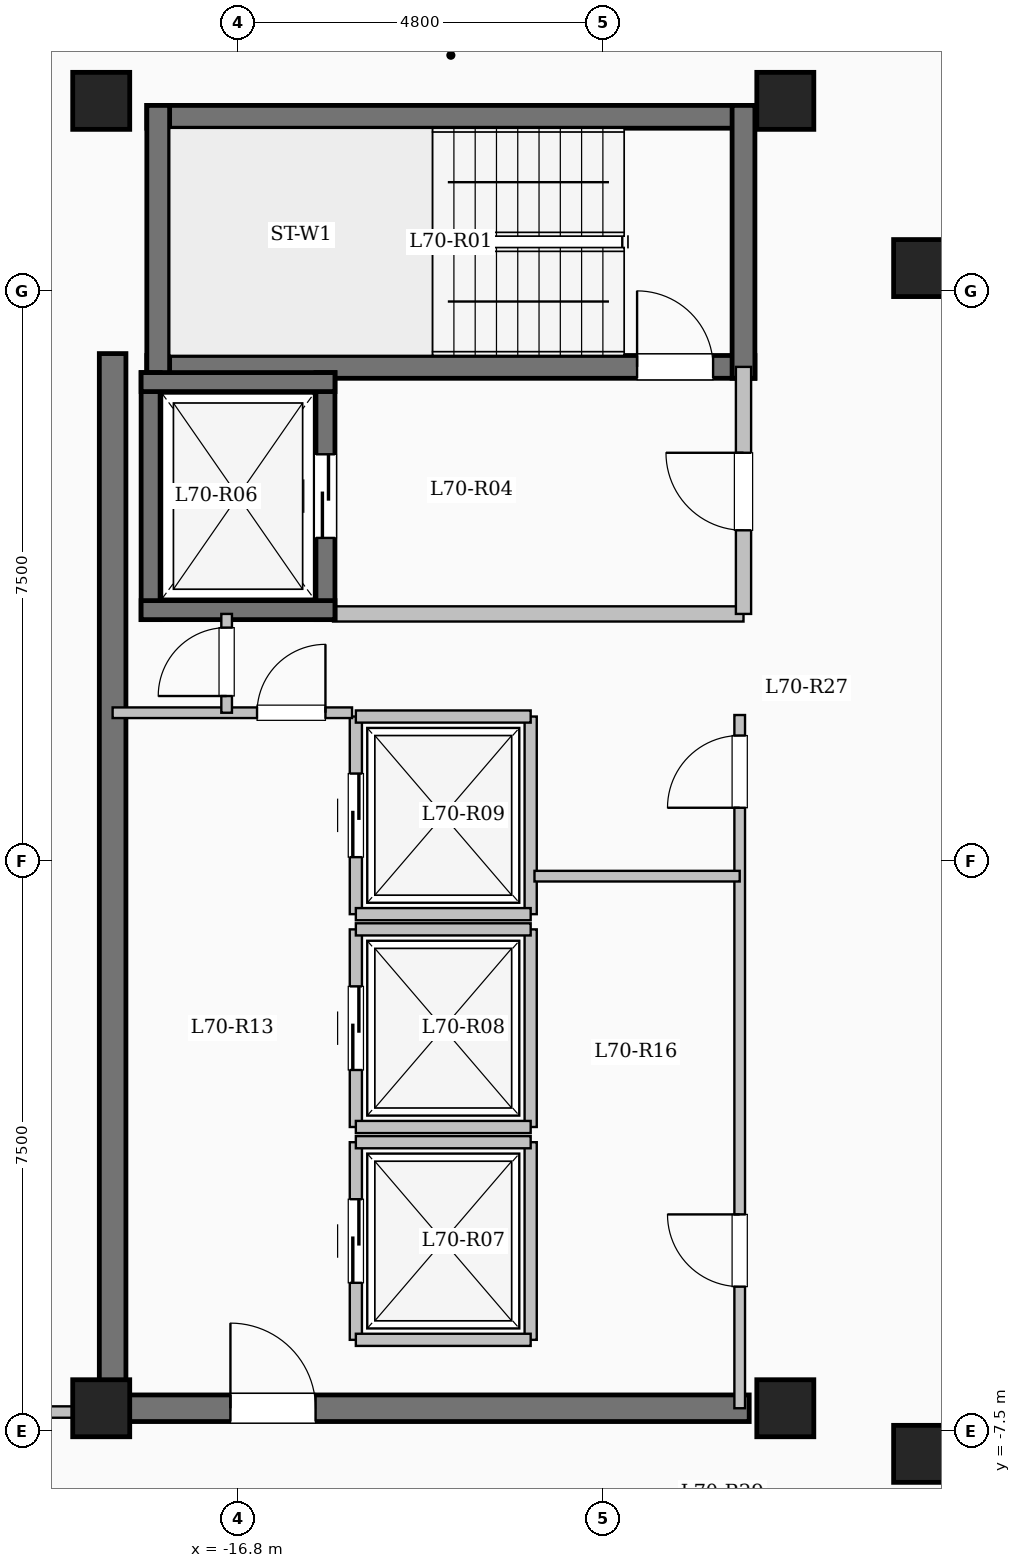
"""IFC4 building model, lengths in metres.
Left out: names, types, materials, properties, quantities, classifications, styles, units other than length and angle.
Written with IfcOpenShell. Run it as: python <this file> out.ifc"""

import sys

from ifc_helpers import new_model, si_unit, direction, frame, frame_2d, origin, origin_2d, place, context, subcontext, project, spatial, rectangle, extrude, element, fill, save


model = new_model("IFC4")
c1 = context("Model", 3, precision=1e-05, world=origin(), true_north=direction((0.0, 1.0)))
c2 = subcontext(c1, "Body", "Model", "MODEL_VIEW")
j1 = project(units=[si_unit("LENGTHUNIT", "METRE"), si_unit("PLANEANGLEUNIT", "RADIAN")], contexts=[c1])
p1 = place(None, origin())
s1 = spatial("IfcSite", under=j1, at=p1, CompositionType="ELEMENT")
p2 = place(p1, origin())
s2 = spatial("IfcBuilding", under=s1, at=p2, CompositionType="ELEMENT")
p3 = place(p2, frame((0.0, 0.0, 258.25)))
s3 = spatial("IfcBuildingStorey", under=s2, at=p3, CompositionType="ELEMENT", Elevation=258.25)
for number, where, z_axis, x_axis in (
    (1, (-7.8, -7.8, 0.0), (0.0, 0.0, 1.0), (1.0, 0.0, 0.0)),
    (2, (-7.8, 7.8, 0.0), (0.0, 0.0, 1.0), (1.0, 0.0, 0.0)),
    (3, (-9.6, -7.2, 0.0), (0.0, 0.0, 1.0), (1.0, 0.0, 0.0)),
    (4, (-9.6, 10.0, 0.0), (0.0, 0.0, 1.0), (1.0, 0.0, 0.0)),
    (5, (-18.6, -7.2, 0.0), (0.0, 0.0, 1.0), (1.0, 0.0, 0.0)),
    (6, (-18.6, 10.0, 0.0), (0.0, 0.0, 1.0), (1.0, 0.0, 0.0)),
):
    element("IfcColumn", number, at=place(p3, frame(where, z_axis=z_axis, x_axis=x_axis)), inside=s3, PredefinedType="COLUMN", context=c2, shape_type="SweptSolid", body=[
        extrude(rectangle(XDim=0.75, YDim=0.75, at=origin_2d()), origin(), (0.0, 0.0, 1.0), 3.35),
    ])
p4 = place(p3, frame((-18.0, 9.79, 0.0), z_axis=(0.0, 0.0, 1.0), x_axis=(1.0, 0.0, 0.0)))
e7 = element("IfcWall", 7, at=p4, inside=s3, PredefinedType="SHEAR", context=c2, shape_type="SweptSolid", body=[
    extrude(rectangle(XDim=8.0, YDim=0.3, at=frame_2d((4.0, 0.0))), origin(), (0.0, 0.0, 1.0), 3.35),
])
p5 = place(p3, frame((-18.0, 6.5, 0.0), z_axis=(0.0, 0.0, 1.0), x_axis=(1.0, 0.0, 0.0)))
e8 = element("IfcWall", 8, at=p5, inside=s3, PredefinedType="SHEAR", context=c2, shape_type="SweptSolid", body=[
    extrude(rectangle(XDim=8.0, YDim=0.3, at=frame_2d((4.0, 0.0))), origin(), (0.0, 0.0, 1.0), 3.35),
])
p6 = place(p5, frame((6.45, 0.0, 0.0)))
e9 = element("IfcOpeningElement", 9, at=p6, cuts=e8, PredefinedType="OPENING", context=c2, shape_type="SweptSolid", body=[
    extrude(rectangle(XDim=1.0, YDim=2.15, at=frame_2d((0.5, 1.075))), frame((0.0, 0.16, 0.0), z_axis=(0.0, -1.0, 0.0), x_axis=(1.0, 0.0, 0.0)), (0.0, 0.0, 1.0), 0.32),
])
for number, where, z_axis, x_axis in (
    (10, (-17.85, 6.35, 0.0), (0.0, 0.0, 1.0), (0.0, 1.0, 0.0)),
    (11, (-10.15, 6.35, 0.0), (0.0, 0.0, 1.0), (0.0, 1.0, 0.0)),
):
    element("IfcWall", number, at=place(p3, frame(where, z_axis=z_axis, x_axis=x_axis)), inside=s3, PredefinedType="SHEAR", context=c2, shape_type="SweptSolid", body=[
        extrude(rectangle(XDim=3.59, YDim=0.3, at=frame_2d((1.795, 0.0))), origin(), (0.0, 0.0, 1.0), 3.35),
    ])
p7 = place(p3, frame((-15.55, 3.25, 0.0), z_axis=(0.0, 0.0, 1.0), x_axis=(1.0, 0.0, 0.0)))
e12 = element("IfcWall", 12, at=p7, inside=s3, PredefinedType="SOLIDWALL", context=c2, shape_type="SweptSolid", body=[
    extrude(rectangle(XDim=5.4, YDim=0.2, at=frame_2d((2.7, 0.0))), origin(), (0.0, 0.0, 1.0), 3.1),
])
p8 = place(p3, frame((-10.15, 3.25, 0.0), z_axis=(0.0, 0.0, 1.0), x_axis=(0.0, 1.0, 0.0)))
e13 = element("IfcWall", 13, at=p8, inside=s3, PredefinedType="SOLIDWALL", context=c2, shape_type="SweptSolid", body=[
    extrude(rectangle(XDim=3.25, YDim=0.2, at=frame_2d((1.625, 0.0))), origin(), (0.0, 0.0, 1.0), 3.1),
])
p9 = place(p8, frame((1.1, 0.0, 0.0)))
e14 = element("IfcOpeningElement", 14, at=p9, cuts=e13, PredefinedType="OPENING", context=c2, shape_type="SweptSolid", body=[
    extrude(rectangle(XDim=1.02, YDim=2.15, at=frame_2d((0.51, 1.075))), frame((0.0, 0.11, 0.0), z_axis=(0.0, -1.0, 0.0), x_axis=(1.0, 0.0, 0.0)), (0.0, 0.0, 1.0), 0.22),
])
p10 = place(p3, frame((-17.95, 3.175, 0.0), z_axis=(0.0, 0.0, 1.0), x_axis=(0.0, 1.0, 0.0)))
e15 = element("IfcWall", 15, at=p10, inside=s3, PredefinedType="SHEAR", context=c2, shape_type="SweptSolid", body=[
    extrude(rectangle(XDim=3.25, YDim=0.25, at=frame_2d((1.625, 0.0))), origin(), (0.0, 0.0, 1.0), 3.35),
])
p11 = place(p3, frame((-15.65, 3.175, 0.0), z_axis=(0.0, 0.0, 1.0), x_axis=(0.0, 1.0, 0.0)))
e16 = element("IfcWall", 16, at=p11, inside=s3, PredefinedType="SHEAR", context=c2, shape_type="SweptSolid", body=[
    extrude(rectangle(XDim=3.25, YDim=0.25, at=frame_2d((1.625, 0.0))), origin(), (0.0, 0.0, 1.0), 3.35),
])
p12 = place(p11, frame((1.075, 0.0, 0.0)))
e17 = element("IfcOpeningElement", 17, at=p12, cuts=e16, PredefinedType="OPENING", context=c2, shape_type="SweptSolid", body=[
    extrude(rectangle(XDim=1.1, YDim=2.15, at=frame_2d((0.55, 1.075))), frame((0.0, 0.135, 0.0), z_axis=(0.0, -1.0, 0.0), x_axis=(1.0, 0.0, 0.0)), (0.0, 0.0, 1.0), 0.27),
])
for number, where, z_axis, x_axis in (
    (18, (-18.075, 3.3, 0.0), (0.0, 0.0, 1.0), (1.0, 0.0, 0.0)),
    (19, (-18.075, 6.3, 0.0), (0.0, 0.0, 1.0), (1.0, 0.0, 0.0)),
):
    element("IfcWall", number, at=place(p3, frame(where, z_axis=z_axis, x_axis=x_axis)), inside=s3, PredefinedType="SHEAR", context=c2, shape_type="SweptSolid", body=[
        extrude(rectangle(XDim=2.55, YDim=0.25, at=frame_2d((1.275, 0.0))), origin(), (0.0, 0.0, 1.0), 3.35),
    ])
p13 = place(p3, frame((-15.25, -6.3, 0.0), z_axis=(0.0, 0.0, 1.0), x_axis=(0.0, 1.0, 0.0)))
e20 = element("IfcWall", 20, at=p13, inside=s3, PredefinedType="SOLIDWALL", context=c2, shape_type="SweptSolid", body=[
    extrude(rectangle(XDim=2.6, YDim=0.16, at=frame_2d((1.3, 0.0))), origin(), (0.0, 0.0, 1.0), 3.1),
])
p14 = place(p13, frame((0.75, 0.0, 0.0)))
e21 = element("IfcOpeningElement", 21, at=p14, cuts=e20, PredefinedType="OPENING", context=c2, shape_type="SweptSolid", body=[
    extrude(rectangle(XDim=1.1, YDim=2.15, at=frame_2d((0.55, 1.075))), frame((0.0, 0.09, 0.0), z_axis=(0.0, -1.0, 0.0), x_axis=(1.0, 0.0, 0.0)), (0.0, 0.0, 1.0), 0.18),
])
p15 = place(p3, frame((-12.95, -6.3, 0.0), z_axis=(0.0, 0.0, 1.0), x_axis=(0.0, 1.0, 0.0)))
e22 = element("IfcWall", 22, at=p15, inside=s3, PredefinedType="SOLIDWALL", context=c2, shape_type="SweptSolid", body=[
    extrude(rectangle(XDim=2.6, YDim=0.16, at=frame_2d((1.3, 0.0))), origin(), (0.0, 0.0, 1.0), 3.1),
])
for number, where, z_axis, x_axis in (
    (23, (-15.25, -6.3, 0.0), (0.0, 0.0, 1.0), (1.0, 0.0, 0.0)),
    (24, (-15.25, -3.7, 0.0), (0.0, 0.0, 1.0), (1.0, 0.0, 0.0)),
):
    element("IfcWall", number, at=place(p3, frame(where, z_axis=z_axis, x_axis=x_axis)), inside=s3, PredefinedType="SOLIDWALL", context=c2, shape_type="SweptSolid", body=[
        extrude(rectangle(XDim=2.3, YDim=0.16, at=frame_2d((1.15, 0.0))), origin(), (0.0, 0.0, 1.0), 3.1),
    ])
p16 = place(p3, frame((-15.25, -3.5, 0.0), z_axis=(0.0, 0.0, 1.0), x_axis=(0.0, 1.0, 0.0)))
e25 = element("IfcWall", 25, at=p16, inside=s3, PredefinedType="SOLIDWALL", context=c2, shape_type="SweptSolid", body=[
    extrude(rectangle(XDim=2.6, YDim=0.16, at=frame_2d((1.3, 0.0))), origin(), (0.0, 0.0, 1.0), 3.1),
])
p17 = place(p16, frame((0.75, 0.0, 0.0)))
e26 = element("IfcOpeningElement", 26, at=p17, cuts=e25, PredefinedType="OPENING", context=c2, shape_type="SweptSolid", body=[
    extrude(rectangle(XDim=1.1, YDim=2.15, at=frame_2d((0.55, 1.075))), frame((0.0, 0.09, 0.0), z_axis=(0.0, -1.0, 0.0), x_axis=(1.0, 0.0, 0.0)), (0.0, 0.0, 1.0), 0.18),
])
p18 = place(p3, frame((-12.95, -3.5, 0.0), z_axis=(0.0, 0.0, 1.0), x_axis=(0.0, 1.0, 0.0)))
e27 = element("IfcWall", 27, at=p18, inside=s3, PredefinedType="SOLIDWALL", context=c2, shape_type="SweptSolid", body=[
    extrude(rectangle(XDim=2.6, YDim=0.16, at=frame_2d((1.3, 0.0))), origin(), (0.0, 0.0, 1.0), 3.1),
])
for number, where, z_axis, x_axis in (
    (28, (-15.25, -3.5, 0.0), (0.0, 0.0, 1.0), (1.0, 0.0, 0.0)),
    (29, (-15.25, -0.9, 0.0), (0.0, 0.0, 1.0), (1.0, 0.0, 0.0)),
):
    element("IfcWall", number, at=place(p3, frame(where, z_axis=z_axis, x_axis=x_axis)), inside=s3, PredefinedType="SOLIDWALL", context=c2, shape_type="SweptSolid", body=[
        extrude(rectangle(XDim=2.3, YDim=0.16, at=frame_2d((1.15, 0.0))), origin(), (0.0, 0.0, 1.0), 3.1),
    ])
p19 = place(p3, frame((-15.25, -0.7, 0.0), z_axis=(0.0, 0.0, 1.0), x_axis=(0.0, 1.0, 0.0)))
e30 = element("IfcWall", 30, at=p19, inside=s3, PredefinedType="SOLIDWALL", context=c2, shape_type="SweptSolid", body=[
    extrude(rectangle(XDim=2.6, YDim=0.16, at=frame_2d((1.3, 0.0))), origin(), (0.0, 0.0, 1.0), 3.1),
])
p20 = place(p19, frame((0.75, 0.0, 0.0)))
e31 = element("IfcOpeningElement", 31, at=p20, cuts=e30, PredefinedType="OPENING", context=c2, shape_type="SweptSolid", body=[
    extrude(rectangle(XDim=1.1, YDim=2.15, at=frame_2d((0.55, 1.075))), frame((0.0, 0.09, 0.0), z_axis=(0.0, -1.0, 0.0), x_axis=(1.0, 0.0, 0.0)), (0.0, 0.0, 1.0), 0.18),
])
p21 = place(p3, frame((-12.95, -0.7, 0.0), z_axis=(0.0, 0.0, 1.0), x_axis=(0.0, 1.0, 0.0)))
e32 = element("IfcWall", 32, at=p21, inside=s3, PredefinedType="SOLIDWALL", context=c2, shape_type="SweptSolid", body=[
    extrude(rectangle(XDim=2.6, YDim=0.16, at=frame_2d((1.3, 0.0))), origin(), (0.0, 0.0, 1.0), 3.1),
])
for number, where, z_axis, x_axis in (
    (33, (-15.25, -0.7, 0.0), (0.0, 0.0, 1.0), (1.0, 0.0, 0.0)),
    (34, (-15.25, 1.9, 0.0), (0.0, 0.0, 1.0), (1.0, 0.0, 0.0)),
):
    element("IfcWall", number, at=place(p3, frame(where, z_axis=z_axis, x_axis=x_axis)), inside=s3, PredefinedType="SOLIDWALL", context=c2, shape_type="SweptSolid", body=[
        extrude(rectangle(XDim=2.3, YDim=0.16, at=frame_2d((1.15, 0.0))), origin(), (0.0, 0.0, 1.0), 3.1),
    ])
p22 = place(p3, frame((-18.45, -7.375, 0.0), z_axis=(0.0, 0.0, 1.0), x_axis=(0.0, 1.0, 0.0)))
e35 = element("IfcWall", 35, at=p22, inside=s3, PredefinedType="SHEAR", context=c2, shape_type="SweptSolid", body=[
    extrude(rectangle(XDim=14.05, YDim=0.35, at=frame_2d((7.025, 0.0))), origin(), (0.0, 0.0, 1.0), 3.35),
])
p23 = place(p3, frame((-18.625, -7.2, 0.0), z_axis=(0.0, 0.0, 1.0), x_axis=(1.0, 0.0, 0.0)))
e36 = element("IfcWall", 36, at=p23, inside=s3, PredefinedType="SHEAR", context=c2, shape_type="SweptSolid", body=[
    extrude(rectangle(XDim=8.55, YDim=0.35, at=frame_2d((4.275, 0.0))), origin(), (0.0, 0.0, 1.0), 3.35),
])
p24 = place(p23, frame((1.725, 0.0, 0.0)))
e37 = element("IfcOpeningElement", 37, at=p24, cuts=e36, PredefinedType="OPENING", context=c2, shape_type="SweptSolid", body=[
    extrude(rectangle(XDim=1.12, YDim=2.15, at=frame_2d((0.56, 1.075))), frame((0.0, 0.185, 0.0), z_axis=(0.0, -1.0, 0.0), x_axis=(1.0, 0.0, 0.0)), (0.0, 0.0, 1.0), 0.37),
])
p25 = place(p3, frame((-18.45, 1.95, 0.0), z_axis=(0.0, 0.0, 1.0), x_axis=(1.0, 0.0, 0.0)))
e38 = element("IfcWall", 38, at=p25, inside=s3, PredefinedType="PARTITIONING", context=c2, shape_type="SweptSolid", body=[
    extrude(rectangle(XDim=3.15, YDim=0.14, at=frame_2d((1.575, 0.0))), origin(), (0.0, 0.0, 1.0), 3.1),
])
p26 = place(p25, frame((1.9, 0.0, 0.0)))
e39 = element("IfcOpeningElement", 39, at=p26, cuts=e38, PredefinedType="OPENING", context=c2, shape_type="SweptSolid", body=[
    extrude(rectangle(XDim=0.9, YDim=2.08, at=frame_2d((0.45, 1.04))), frame((0.0, 0.08, 0.0), z_axis=(0.0, -1.0, 0.0), x_axis=(1.0, 0.0, 0.0)), (0.0, 0.0, 1.0), 0.16),
])
p27 = place(p3, frame((-16.95, 1.95, 0.0), z_axis=(0.0, 0.0, 1.0), x_axis=(0.0, 1.0, 0.0)))
e40 = element("IfcWall", 40, at=p27, inside=s3, PredefinedType="PARTITIONING", context=c2, shape_type="SweptSolid", body=[
    extrude(rectangle(XDim=1.3, YDim=0.14, at=frame_2d((0.65, 0.0))), origin(), (0.0, 0.0, 1.0), 3.1),
])
p28 = place(p27, frame((0.22, 0.0, 0.0)))
e41 = element("IfcOpeningElement", 41, at=p28, cuts=e40, PredefinedType="OPENING", context=c2, shape_type="SweptSolid", body=[
    extrude(rectangle(XDim=0.9, YDim=2.08, at=frame_2d((0.45, 1.04))), frame((0.0, 0.08, 0.0), z_axis=(0.0, -1.0, 0.0), x_axis=(1.0, 0.0, 0.0)), (0.0, 0.0, 1.0), 0.16),
])
p29 = place(p3, frame((-10.2, -7.2, 0.0), z_axis=(0.0, 0.0, 1.0), x_axis=(0.0, 1.0, 0.0)))
e42 = element("IfcWall", 42, at=p29, inside=s3, PredefinedType="PARTITIONING", context=c2, shape_type="SweptSolid", body=[
    extrude(rectangle(XDim=9.12, YDim=0.14, at=frame_2d((4.56, 0.0))), origin(), (0.0, 0.0, 1.0), 3.1),
])
p30 = place(p29, frame((1.6, 0.0, 0.0)))
e43 = element("IfcOpeningElement", 43, at=p30, cuts=e42, PredefinedType="OPENING", context=c2, shape_type="SweptSolid", body=[
    extrude(rectangle(XDim=0.95, YDim=2.12, at=frame_2d((0.475, 1.06))), frame((0.0, 0.08, 0.0), z_axis=(0.0, -1.0, 0.0), x_axis=(1.0, 0.0, 0.0)), (0.0, 0.0, 1.0), 0.16),
])
p31 = place(p29, frame((7.9, 0.0, 0.0)))
e44 = element("IfcOpeningElement", 44, at=p31, cuts=e42, PredefinedType="OPENING", context=c2, shape_type="SweptSolid", body=[
    extrude(rectangle(XDim=0.95, YDim=2.12, at=frame_2d((0.475, 1.06))), frame((0.0, 0.08, 0.0), z_axis=(0.0, -1.0, 0.0), x_axis=(1.0, 0.0, 0.0)), (0.0, 0.0, 1.0), 0.16),
])
p32 = place(p3, frame((-12.9, -0.2, 0.0), z_axis=(0.0, 0.0, 1.0), x_axis=(1.0, 0.0, 0.0)))
e45 = element("IfcWall", 45, at=p32, inside=s3, PredefinedType="PARTITIONING", context=c2, shape_type="SweptSolid", body=[
    extrude(rectangle(XDim=2.7, YDim=0.14, at=frame_2d((1.35, 0.0))), origin(), (0.0, 0.0, 1.0), 3.1),
])
p33 = place(p3, frame((-22.68, -7.25, 0.0), z_axis=(0.0, 0.0, 1.0), x_axis=(1.0, 0.0, 0.0)))
e46 = element("IfcWall", 46, at=p33, inside=s3, PredefinedType="PARTITIONING", context=c2, shape_type="SweptSolid", body=[
    extrude(rectangle(XDim=4.23, YDim=0.15, at=frame_2d((2.115, 0.0))), origin(), (0.0, 0.0, 1.0), 3.1),
])
p34 = place(p33, frame((1.63, 0.0, 0.0)))
e47 = element("IfcOpeningElement", 47, at=p34, cuts=e46, PredefinedType="OPENING", context=c2, shape_type="SweptSolid", body=[
    extrude(rectangle(XDim=1.08, YDim=2.15, at=frame_2d((0.54, 1.075))), frame((0.0, 0.085, 0.0), z_axis=(0.0, -1.0, 0.0), x_axis=(1.0, 0.0, 0.0)), (0.0, 0.0, 1.0), 0.17),
])
p35 = place(p6, origin())
e48 = element("IfcDoor", 48, at=p35, inside=s3, OperationType="SINGLE_SWING_LEFT", PredefinedType="DOOR", context=c2, shape_type="SweptSolid", body=[
    extrude(rectangle(XDim=1.0, YDim=2.15, at=frame_2d((0.5, 1.075))), frame((0.0, 0.025, 0.0), z_axis=(0.0, -1.0, 0.0), x_axis=(1.0, 0.0, 0.0)), (0.0, 0.0, 1.0), 0.05),
])
fill(e9, e48)
p36 = place(p9, origin())
e49 = element("IfcDoor", 49, at=p36, inside=s3, OperationType="SINGLE_SWING_RIGHT", PredefinedType="DOOR", context=c2, shape_type="SweptSolid", body=[
    extrude(rectangle(XDim=1.02, YDim=2.15, at=frame_2d((0.51, 1.075))), frame((0.0, 0.025, 0.0), z_axis=(0.0, -1.0, 0.0), x_axis=(1.0, 0.0, 0.0)), (0.0, 0.0, 1.0), 0.05),
])
fill(e14, e49)
p37 = place(p12, origin())
e50 = element("IfcDoor", 50, at=p37, inside=s3, OperationType="SLIDING_TO_LEFT", PredefinedType="DOOR", context=c2, shape_type="SweptSolid", body=[
    extrude(rectangle(XDim=1.1, YDim=2.15, at=frame_2d((0.55, 1.075))), frame((0.0, 0.025, 0.0), z_axis=(0.0, -1.0, 0.0), x_axis=(1.0, 0.0, 0.0)), (0.0, 0.0, 1.0), 0.05),
])
fill(e17, e50)
p38 = place(p14, origin())
e51 = element("IfcDoor", 51, at=p38, inside=s3, OperationType="SLIDING_TO_LEFT", PredefinedType="DOOR", context=c2, shape_type="SweptSolid", body=[
    extrude(rectangle(XDim=1.1, YDim=2.15, at=frame_2d((0.55, 1.075))), frame((0.0, 0.025, 0.0), z_axis=(0.0, -1.0, 0.0), x_axis=(1.0, 0.0, 0.0)), (0.0, 0.0, 1.0), 0.05),
])
fill(e21, e51)
p39 = place(p17, origin())
e52 = element("IfcDoor", 52, at=p39, inside=s3, OperationType="SLIDING_TO_LEFT", PredefinedType="DOOR", context=c2, shape_type="SweptSolid", body=[
    extrude(rectangle(XDim=1.1, YDim=2.15, at=frame_2d((0.55, 1.075))), frame((0.0, 0.025, 0.0), z_axis=(0.0, -1.0, 0.0), x_axis=(1.0, 0.0, 0.0)), (0.0, 0.0, 1.0), 0.05),
])
fill(e26, e52)
p40 = place(p20, origin())
e53 = element("IfcDoor", 53, at=p40, inside=s3, OperationType="SLIDING_TO_LEFT", PredefinedType="DOOR", context=c2, shape_type="SweptSolid", body=[
    extrude(rectangle(XDim=1.1, YDim=2.15, at=frame_2d((0.55, 1.075))), frame((0.0, 0.025, 0.0), z_axis=(0.0, -1.0, 0.0), x_axis=(1.0, 0.0, 0.0)), (0.0, 0.0, 1.0), 0.05),
])
fill(e31, e53)
p41 = place(p24, origin())
e54 = element("IfcDoor", 54, at=p41, inside=s3, OperationType="SINGLE_SWING_LEFT", PredefinedType="DOOR", context=c2, shape_type="SweptSolid", body=[
    extrude(rectangle(XDim=1.12, YDim=2.15, at=frame_2d((0.56, 1.075))), frame((0.0, 0.025, 0.0), z_axis=(0.0, -1.0, 0.0), x_axis=(1.0, 0.0, 0.0)), (0.0, 0.0, 1.0), 0.05),
])
fill(e37, e54)
p42 = place(p26, origin())
e55 = element("IfcDoor", 55, at=p42, inside=s3, OperationType="SINGLE_SWING_RIGHT", PredefinedType="DOOR", context=c2, shape_type="SweptSolid", body=[
    extrude(rectangle(XDim=0.9, YDim=2.08, at=frame_2d((0.45, 1.04))), frame((0.0, 0.025, 0.0), z_axis=(0.0, -1.0, 0.0), x_axis=(1.0, 0.0, 0.0)), (0.0, 0.0, 1.0), 0.05),
])
fill(e39, e55)
p43 = place(p28, origin())
e56 = element("IfcDoor", 56, at=p43, inside=s3, OperationType="SINGLE_SWING_LEFT", PredefinedType="DOOR", context=c2, shape_type="SweptSolid", body=[
    extrude(rectangle(XDim=0.9, YDim=2.08, at=frame_2d((0.45, 1.04))), frame((0.0, 0.025, 0.0), z_axis=(0.0, -1.0, 0.0), x_axis=(1.0, 0.0, 0.0)), (0.0, 0.0, 1.0), 0.05),
])
fill(e41, e56)
p44 = place(p30, origin())
e57 = element("IfcDoor", 57, at=p44, inside=s3, OperationType="SINGLE_SWING_RIGHT", PredefinedType="DOOR", context=c2, shape_type="SweptSolid", body=[
    extrude(rectangle(XDim=0.95, YDim=2.12, at=frame_2d((0.475, 1.06))), frame((0.0, 0.025, 0.0), z_axis=(0.0, -1.0, 0.0), x_axis=(1.0, 0.0, 0.0)), (0.0, 0.0, 1.0), 0.05),
])
fill(e43, e57)
p45 = place(p31, origin())
e58 = element("IfcDoor", 58, at=p45, inside=s3, OperationType="SINGLE_SWING_LEFT", PredefinedType="DOOR", context=c2, shape_type="SweptSolid", body=[
    extrude(rectangle(XDim=0.95, YDim=2.12, at=frame_2d((0.475, 1.06))), frame((0.0, 0.025, 0.0), z_axis=(0.0, -1.0, 0.0), x_axis=(1.0, 0.0, 0.0)), (0.0, 0.0, 1.0), 0.05),
])
fill(e44, e58)
save(model, sys.argv[1])
